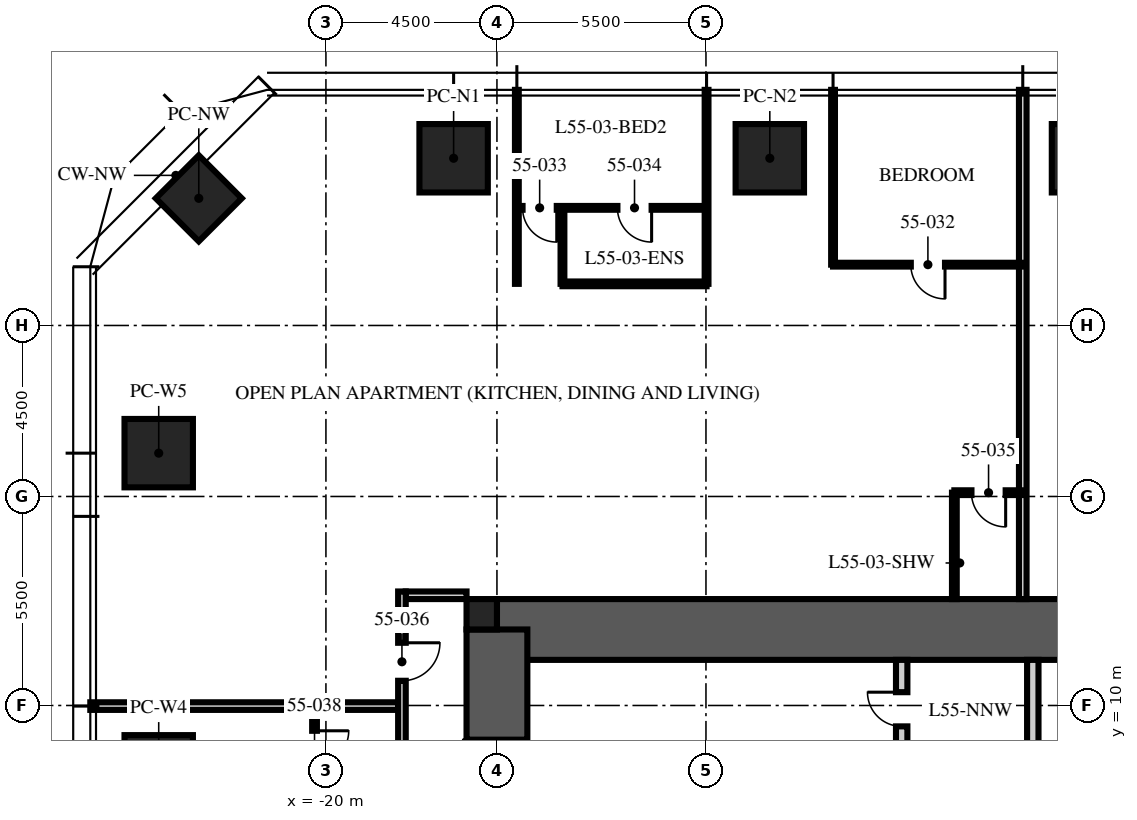
"""IFC4 building model, lengths in metres.
Left out: names, types, materials, properties, quantities, classifications, styles, units other than length and angle.
Written with IfcOpenShell. Run it as: python <this file> out.ifc"""

import sys

from ifc_helpers import new_model, si_unit, direction, frame, frame_2d, origin, origin_2d, place, context, subcontext, project, spatial, rectangle, extrude, element, fill, save


model = new_model("IFC4")
c1 = context("Model", 3, precision=1e-05, world=origin(), true_north=direction((0.0, 1.0)))
c2 = subcontext(c1, "Body", "Model", "MODEL_VIEW")
j1 = project(units=[si_unit("LENGTHUNIT", "METRE"), si_unit("PLANEANGLEUNIT", "RADIAN")], contexts=[c1])
p1 = place(None, origin())
s1 = spatial("IfcSite", under=j1, at=p1, CompositionType="ELEMENT")
p2 = place(p1, origin())
s2 = spatial("IfcBuilding", under=s1, at=p2, CompositionType="ELEMENT")
p3 = place(p2, frame((0.0, 0.0, 222.0)))
s3 = spatial("IfcBuildingStorey", under=s2, at=p3, CompositionType="ELEMENT", Elevation=222.0)
p4 = place(p3, frame((-15.5, 12.0, -0.25), z_axis=(0.0, 0.0, 1.0), x_axis=(1.0, 0.0, 0.0)))
e1 = element("IfcWall", 1, at=p4, inside=s3, PredefinedType="SHEAR", context=c2, shape_type="SweptSolid", body=[
    extrude(rectangle(XDim=31.0, YDim=1.6, at=frame_2d((15.5, 0.0))), origin(), (0.0, 0.0, 1.0), 3.75),
])
p5 = place(p3, frame((-15.5, -12.0, -0.25), z_axis=(0.0, 0.0, 1.0), x_axis=(0.0, 1.0, 0.0)))
e2 = element("IfcWall", 2, at=p5, inside=s3, PredefinedType="SHEAR", context=c2, shape_type="SweptSolid", body=[
    extrude(rectangle(XDim=24.0, YDim=1.6, at=frame_2d((12.0, 0.0))), origin(), (0.0, 0.0, 1.0), 3.75),
])
p6 = place(p5, frame((3.2, 0.0, 0.25)))
e3 = element("IfcOpeningElement", 3, at=p6, cuts=e2, PredefinedType="OPENING", context=c2, shape_type="SweptSolid", body=[
    extrude(rectangle(XDim=1.2, YDim=2.1, at=frame_2d((0.6, 1.05))), frame((0.0, 0.81, 0.0), z_axis=(0.0, -1.0, 0.0), x_axis=(1.0, 0.0, 0.0)), (0.0, 0.0, 1.0), 1.62),
])
p7 = place(p5, frame((19.3, 0.0, 0.25)))
e4 = element("IfcOpeningElement", 4, at=p7, cuts=e2, PredefinedType="OPENING", context=c2, shape_type="SweptSolid", body=[
    extrude(rectangle(XDim=1.8, YDim=2.1, at=frame_2d((0.9, 1.05))), frame((0.0, 0.81, 0.0), z_axis=(0.0, -1.0, 0.0), x_axis=(1.0, 0.0, 0.0)), (0.0, 0.0, 1.0), 1.62),
])
p8 = place(p3, frame((-15.9, 12.4, -0.25), z_axis=(0.0, 0.0, 1.0), x_axis=(1.0, 0.0, 0.0)))
e5 = element("IfcColumn", 5, at=p8, inside=s3, PredefinedType="COLUMN", context=c2, shape_type="SweptSolid", body=[
    extrude(rectangle(XDim=0.8, YDim=0.8, at=origin_2d()), origin(), (0.0, 0.0, 1.0), 3.75),
])
for number, where, z_axis, x_axis in (
    (6, (-16.64, 24.4, 0.0), (0.0, 0.0, 1.0), (1.0, 0.0, 0.0)),
    (7, (-8.32, 24.4, 0.0), (0.0, 0.0, 1.0), (1.0, 0.0, 0.0)),
    (8, (0.0, 24.4, 0.0), (0.0, 0.0, 1.0), (1.0, 0.0, 0.0)),
    (9, (-24.4, 8.32, 0.0), (0.0, 0.0, 1.0), (0.0, 1.0, 0.0)),
    (10, (-24.4, 16.64, 0.0), (0.0, 0.0, 1.0), (0.0, 1.0, 0.0)),
):
    element("IfcColumn", number, at=place(p3, frame(where, z_axis=z_axis, x_axis=x_axis)), inside=s3, PredefinedType="COLUMN", context=c2, shape_type="SweptSolid", body=[
        extrude(rectangle(XDim=1.8, YDim=1.8, at=origin_2d()), origin(), (0.0, 0.0, 1.0), 3.75),
    ])
p9 = place(p3, frame((-23.346, 23.346, 0.0), z_axis=(0.0, 0.0, 1.0), x_axis=(0.707106781187, 0.707106781187, 0.0)))
e11 = element("IfcColumn", 11, at=p9, inside=s3, PredefinedType="COLUMN", context=c2, shape_type="SweptSolid", body=[
    extrude(rectangle(XDim=1.6, YDim=1.6, at=origin_2d()), origin(), (0.0, 0.0, 1.0), 3.75),
])
p10 = place(p3, frame((-4.85, 5.3, 0.0), z_axis=(0.0, 0.0, 1.0), x_axis=(0.0, 1.0, 0.0)))
e12 = element("IfcWall", 12, at=p10, inside=s3, PredefinedType="PARTITIONING", context=c2, shape_type="SweptSolid", body=[
    extrude(rectangle(XDim=5.9, YDim=0.3, at=frame_2d((2.95, 0.0))), origin(), (0.0, 0.0, 1.0), 3.5),
])
p11 = place(p10, frame((4.15, 0.0, 0.0)))
e13 = element("IfcOpeningElement", 13, at=p11, cuts=e12, PredefinedType="OPENING", context=c2, shape_type="SweptSolid", body=[
    extrude(rectangle(XDim=0.9, YDim=2.1, at=frame_2d((0.45, 1.05))), frame((0.0, 0.16, 0.0), z_axis=(0.0, -1.0, 0.0), x_axis=(1.0, 0.0, 0.0)), (0.0, 0.0, 1.0), 0.32),
])
p12 = place(p3, frame((-1.4, 8.5, 0.0), z_axis=(0.0, 0.0, 1.0), x_axis=(0.0, 1.0, 0.0)))
e14 = element("IfcWall", 14, at=p12, inside=s3, PredefinedType="PARTITIONING", context=c2, shape_type="SweptSolid", body=[
    extrude(rectangle(XDim=2.7, YDim=0.3, at=frame_2d((1.35, 0.0))), origin(), (0.0, 0.0, 1.0), 3.5),
])
p13 = place(p3, frame((-16.3, 12.9, 0.0), z_axis=(0.0, 0.0, 1.0), x_axis=(-1.0, 0.0, 0.0)))
e15 = element("IfcWall", 15, at=p13, inside=s3, PredefinedType="PARTITIONING", context=c2, shape_type="SweptSolid", body=[
    extrude(rectangle(XDim=1.6, YDim=0.2, at=frame_2d((0.8, 0.0))), origin(), (0.0, 0.0, 1.0), 2.3),
])
p14 = place(p3, frame((-1.664, 12.8, 0.0), z_axis=(0.0, 0.0, 1.0), x_axis=(0.0, 1.0, 0.0)))
e16 = element("IfcWall", 16, at=p14, inside=s3, PredefinedType="PARTITIONING", context=c2, shape_type="SweptSolid", body=[
    extrude(rectangle(XDim=13.4, YDim=0.2, at=frame_2d((6.7, 0.0))), origin(), (0.0, 0.0, 1.0), 2.91),
])
p15 = place(p3, frame((-6.656, 21.6, 0.0), z_axis=(0.0, 0.0, 1.0), x_axis=(0.0, 1.0, 0.0)))
e17 = element("IfcWall", 17, at=p15, inside=s3, PredefinedType="PARTITIONING", context=c2, shape_type="SweptSolid", body=[
    extrude(rectangle(XDim=4.6, YDim=0.1, at=frame_2d((2.3, 0.0))), origin(), (0.0, 0.0, 1.0), 2.91),
])
for number, where, z_axis, x_axis in (
    (18, (-9.984, 21.095, 0.0), (0.0, 0.0, 1.0), (0.0, 1.0, 0.0)),
    (19, (-14.976, 21.095, 0.0), (0.0, 0.0, 1.0), (0.0, 1.0, 0.0)),
):
    element("IfcWall", number, at=place(p3, frame(where, z_axis=z_axis, x_axis=x_axis)), inside=s3, PredefinedType="PARTITIONING", context=c2, shape_type="SweptSolid", body=[
        extrude(rectangle(XDim=5.105, YDim=0.1, at=frame_2d((2.552, 0.0))), origin(), (0.0, 0.0, 1.0), 2.91),
    ])
p16 = place(p3, frame((-18.1, 9.984, 0.0), z_axis=(0.0, 0.0, 1.0), x_axis=(-1.0, 0.0, 0.0)))
e20 = element("IfcWall", 20, at=p16, inside=s3, PredefinedType="PARTITIONING", context=c2, shape_type="SweptSolid", body=[
    extrude(rectangle(XDim=8.1, YDim=0.2, at=frame_2d((4.05, 0.0))), origin(), (0.0, 0.0, 1.0), 2.91),
])
p17 = place(p3, frame((-1.664, 21.6, 0.0), z_axis=(0.0, 0.0, 1.0), x_axis=(-1.0, 0.0, 0.0)))
e21 = element("IfcWall", 21, at=p17, inside=s3, PredefinedType="PARTITIONING", context=c2, shape_type="SweptSolid", body=[
    extrude(rectangle(XDim=4.992, YDim=0.1, at=frame_2d((2.496, 0.0))), origin(), (0.0, 0.0, 1.0), 2.81),
])
p18 = place(p17, frame((2.046, 0.0, 0.0)))
e22 = element("IfcOpeningElement", 22, at=p18, cuts=e21, PredefinedType="OPENING", context=c2, shape_type="SweptSolid", body=[
    extrude(rectangle(XDim=0.9, YDim=2.1, at=frame_2d((0.45, 1.05))), frame((0.0, 0.06, 0.0), z_axis=(0.0, -1.0, 0.0), x_axis=(1.0, 0.0, 0.0)), (0.0, 0.0, 1.0), 0.12),
])
p19 = place(p3, frame((-9.984, 23.095, 0.0), z_axis=(0.0, 0.0, 1.0), x_axis=(-1.0, 0.0, 0.0)))
e23 = element("IfcWall", 23, at=p19, inside=s3, PredefinedType="PARTITIONING", context=c2, shape_type="SweptSolid", body=[
    extrude(rectangle(XDim=4.992, YDim=0.1, at=frame_2d((2.496, 0.0))), origin(), (0.0, 0.0, 1.0), 2.81),
])
p20 = place(p19, frame((3.942, 0.0, 0.0)))
e24 = element("IfcOpeningElement", 24, at=p20, cuts=e23, PredefinedType="OPENING", context=c2, shape_type="SweptSolid", body=[
    extrude(rectangle(XDim=0.9, YDim=2.1, at=frame_2d((0.45, 1.05))), frame((0.0, 0.06, 0.0), z_axis=(0.0, -1.0, 0.0), x_axis=(1.0, 0.0, 0.0)), (0.0, 0.0, 1.0), 0.12),
])
p21 = place(p19, frame((1.446, 0.0, 0.0)))
e25 = element("IfcOpeningElement", 25, at=p21, cuts=e23, PredefinedType="OPENING", context=c2, shape_type="SweptSolid", body=[
    extrude(rectangle(XDim=0.9, YDim=2.1, at=frame_2d((0.45, 1.05))), frame((0.0, 0.06, 0.0), z_axis=(0.0, -1.0, 0.0), x_axis=(1.0, 0.0, 0.0)), (0.0, 0.0, 1.0), 0.12),
])
p22 = place(p3, frame((-13.776, 21.095, 0.0), z_axis=(0.0, 0.0, 1.0), x_axis=(0.0, 1.0, 0.0)))
e26 = element("IfcWall", 26, at=p22, inside=s3, PredefinedType="PARTITIONING", context=c2, shape_type="SweptSolid", body=[
    extrude(rectangle(XDim=2.0, YDim=0.1, at=frame_2d((1.0, 0.0))), origin(), (0.0, 0.0, 1.0), 3.5),
])
p23 = place(p3, frame((-9.984, 21.095, 0.0), z_axis=(0.0, 0.0, 1.0), x_axis=(-1.0, 0.0, 0.0)))
e27 = element("IfcWall", 27, at=p23, inside=s3, PredefinedType="PARTITIONING", context=c2, shape_type="SweptSolid", body=[
    extrude(rectangle(XDim=3.792, YDim=0.125, at=frame_2d((1.896, 0.0))), origin(), (0.0, 0.0, 1.0), 2.81),
])
p24 = place(p3, frame((-1.664, 15.6, 0.0), z_axis=(0.0, 0.0, 1.0), x_axis=(-1.0, 0.0, 0.0)))
e28 = element("IfcWall", 28, at=p24, inside=s3, PredefinedType="PARTITIONING", context=c2, shape_type="SweptSolid", body=[
    extrude(rectangle(XDim=1.8, YDim=0.125, at=frame_2d((0.9, 0.0))), origin(), (0.0, 0.0, 1.0), 3.5),
])
p25 = place(p24, frame((0.45, 0.0, 0.0)))
e29 = element("IfcOpeningElement", 29, at=p25, cuts=e28, PredefinedType="OPENING", context=c2, shape_type="SweptSolid", body=[
    extrude(rectangle(XDim=0.9, YDim=2.1, at=frame_2d((0.45, 1.05))), frame((0.0, 0.073, 0.0), z_axis=(0.0, -1.0, 0.0), x_axis=(1.0, 0.0, 0.0)), (0.0, 0.0, 1.0), 0.145),
])
p26 = place(p3, frame((-3.464, 12.8, 0.0), z_axis=(0.0, 0.0, 1.0), x_axis=(0.0, 1.0, 0.0)))
e30 = element("IfcWall", 30, at=p26, inside=s3, PredefinedType="PARTITIONING", context=c2, shape_type="SweptSolid", body=[
    extrude(rectangle(XDim=2.8, YDim=0.125, at=frame_2d((1.4, 0.0))), origin(), (0.0, 0.0, 1.0), 3.5),
])
p27 = place(p3, frame((-20.3, 9.984, 0.0), z_axis=(0.0, 0.0, 1.0), x_axis=(0.0, -1.0, 0.0)))
e31 = element("IfcWall", 31, at=p27, inside=s3, PredefinedType="PARTITIONING", context=c2, shape_type="SweptSolid", body=[
    extrude(rectangle(XDim=2.2, YDim=0.125, at=frame_2d((1.1, 0.0))), origin(), (0.0, 0.0, 1.0), 2.6),
])
p28 = place(p27, frame((0.65, 0.0, 0.0)))
e32 = element("IfcOpeningElement", 32, at=p28, cuts=e31, PredefinedType="OPENING", context=c2, shape_type="SweptSolid", body=[
    extrude(rectangle(XDim=0.9, YDim=2.1, at=frame_2d((0.45, 1.05))), frame((0.0, 0.073, 0.0), z_axis=(0.0, -1.0, 0.0), x_axis=(1.0, 0.0, 0.0)), (0.0, 0.0, 1.0), 0.145),
])
p29 = place(p3, frame((-18.0, 13.0, 0.0), z_axis=(0.0, 0.0, 1.0), x_axis=(0.0, -1.0, 0.0)))
e33 = element("IfcWall", 33, at=p29, inside=s3, PredefinedType="PARTITIONING", context=c2, shape_type="SweptSolid", body=[
    extrude(rectangle(XDim=26.0, YDim=0.2, at=frame_2d((13.0, 0.0))), origin(), (0.0, 0.0, 1.0), 2.6),
])
p30 = place(p29, frame((1.35, 0.0, 0.0)))
e34 = element("IfcOpeningElement", 34, at=p30, cuts=e33, PredefinedType="OPENING", context=c2, shape_type="SweptSolid", body=[
    extrude(rectangle(XDim=1.0, YDim=2.2, at=frame_2d((0.5, 1.1))), frame((0.0, 0.11, 0.0), z_axis=(0.0, -1.0, 0.0), x_axis=(1.0, 0.0, 0.0)), (0.0, 0.0, 1.0), 0.22),
])
p31 = place(p29, frame((13.036, 0.0, 0.0)))
e35 = element("IfcOpeningElement", 35, at=p31, cuts=e33, PredefinedType="OPENING", context=c2, shape_type="SweptSolid", body=[
    extrude(rectangle(XDim=1.0, YDim=2.2, at=frame_2d((0.5, 1.1))), frame((0.0, 0.11, 0.0), z_axis=(0.0, -1.0, 0.0), x_axis=(1.0, 0.0, 0.0)), (0.0, 0.0, 1.0), 0.22),
])
p32 = place(p29, frame((23.684, 0.0, 0.0)))
e36 = element("IfcOpeningElement", 36, at=p32, cuts=e33, PredefinedType="OPENING", context=c2, shape_type="SweptSolid", body=[
    extrude(rectangle(XDim=1.0, YDim=2.2, at=frame_2d((0.5, 1.1))), frame((0.0, 0.11, 0.0), z_axis=(0.0, -1.0, 0.0), x_axis=(1.0, 0.0, 0.0)), (0.0, 0.0, 1.0), 0.22),
])
p33 = place(p7, origin())
e37 = element("IfcDoor", 37, at=p33, inside=s3, OperationType="DOUBLE_DOOR_SINGLE_SWING", PredefinedType="DOOR", context=c2, shape_type="SweptSolid", body=[
    extrude(rectangle(XDim=1.8, YDim=2.1, at=frame_2d((0.9, 1.05))), frame((0.0, 0.025, 0.0), z_axis=(0.0, -1.0, 0.0), x_axis=(1.0, 0.0, 0.0)), (0.0, 0.0, 1.0), 0.05),
])
fill(e4, e37)
p34 = place(p11, origin())
e38 = element("IfcDoor", 38, at=p34, inside=s3, OperationType="SINGLE_SWING_RIGHT", PredefinedType="DOOR", context=c2, shape_type="SweptSolid", body=[
    extrude(rectangle(XDim=0.9, YDim=2.1, at=frame_2d((0.45, 1.05))), frame((0.0, 0.025, 0.0), z_axis=(0.0, -1.0, 0.0), x_axis=(1.0, 0.0, 0.0)), (0.0, 0.0, 1.0), 0.05),
])
fill(e13, e38)
p35 = place(p18, origin())
e39 = element("IfcDoor", 39, at=p35, inside=s3, OperationType="SINGLE_SWING_LEFT", PredefinedType="DOOR", context=c2, shape_type="SweptSolid", body=[
    extrude(rectangle(XDim=0.9, YDim=2.1, at=frame_2d((0.45, 1.05))), frame((0.0, 0.025, 0.0), z_axis=(0.0, -1.0, 0.0), x_axis=(1.0, 0.0, 0.0)), (0.0, 0.0, 1.0), 0.05),
])
fill(e22, e39)
p36 = place(p20, origin())
e40 = element("IfcDoor", 40, at=p36, inside=s3, OperationType="SINGLE_SWING_LEFT", PredefinedType="DOOR", context=c2, shape_type="SweptSolid", body=[
    extrude(rectangle(XDim=0.9, YDim=2.1, at=frame_2d((0.45, 1.05))), frame((0.0, 0.025, 0.0), z_axis=(0.0, -1.0, 0.0), x_axis=(1.0, 0.0, 0.0)), (0.0, 0.0, 1.0), 0.05),
])
fill(e24, e40)
p37 = place(p21, origin())
e41 = element("IfcDoor", 41, at=p37, inside=s3, OperationType="SINGLE_SWING_LEFT", PredefinedType="DOOR", context=c2, shape_type="SweptSolid", body=[
    extrude(rectangle(XDim=0.9, YDim=2.1, at=frame_2d((0.45, 1.05))), frame((0.0, 0.025, 0.0), z_axis=(0.0, -1.0, 0.0), x_axis=(1.0, 0.0, 0.0)), (0.0, 0.0, 1.0), 0.05),
])
fill(e25, e41)
p38 = place(p25, origin())
e42 = element("IfcDoor", 42, at=p38, inside=s3, OperationType="SINGLE_SWING_LEFT", PredefinedType="DOOR", context=c2, shape_type="SweptSolid", body=[
    extrude(rectangle(XDim=0.9, YDim=2.1, at=frame_2d((0.45, 1.05))), frame((0.0, 0.025, 0.0), z_axis=(0.0, -1.0, 0.0), x_axis=(1.0, 0.0, 0.0)), (0.0, 0.0, 1.0), 0.05),
])
fill(e29, e42)
p39 = place(p30, origin())
e43 = element("IfcDoor", 43, at=p39, inside=s3, OperationType="SINGLE_SWING_LEFT", PredefinedType="DOOR", context=c2, shape_type="SweptSolid", body=[
    extrude(rectangle(XDim=1.0, YDim=2.2, at=frame_2d((0.5, 1.1))), frame((0.0, 0.025, 0.0), z_axis=(0.0, -1.0, 0.0), x_axis=(1.0, 0.0, 0.0)), (0.0, 0.0, 1.0), 0.05),
])
fill(e34, e43)
p40 = place(p28, origin())
e44 = element("IfcDoor", 44, at=p40, inside=s3, OperationType="SINGLE_SWING_LEFT", PredefinedType="DOOR", context=c2, shape_type="SweptSolid", body=[
    extrude(rectangle(XDim=0.9, YDim=2.1, at=frame_2d((0.45, 1.05))), frame((0.0, 0.025, 0.0), z_axis=(0.0, -1.0, 0.0), x_axis=(1.0, 0.0, 0.0)), (0.0, 0.0, 1.0), 0.05),
])
fill(e32, e44)
save(model, sys.argv[1])
